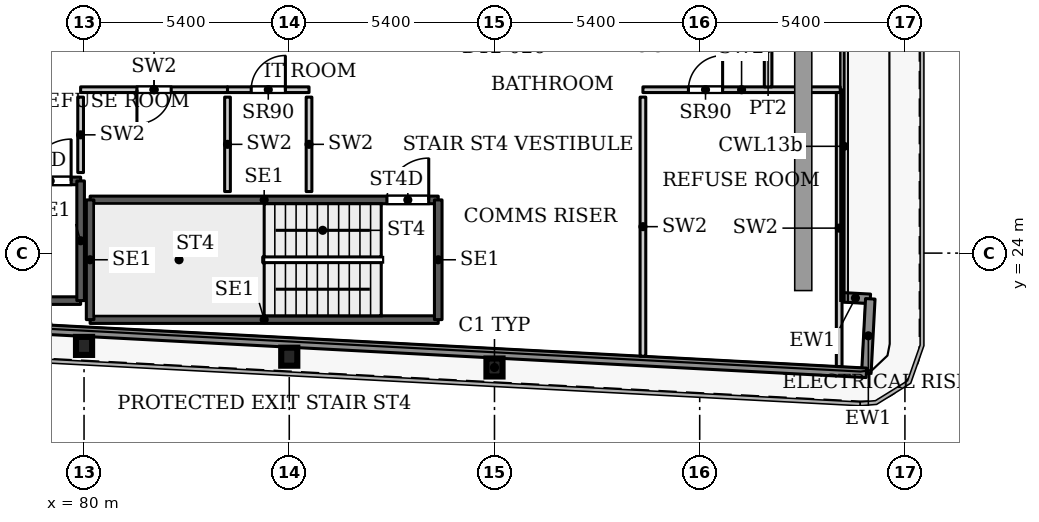
"""IFC4 building model, lengths in metres.
Left out: names, types, materials, properties, quantities, classifications, styles, units other than length and angle.
Written with IfcOpenShell. Run it as: python <this file> out.ifc"""

import sys

from ifc_helpers import new_model, si_unit, direction, frame, frame_2d, origin, origin_2d, place, context, subcontext, project, spatial, rectangle, i_section, extrude, source, transform, mapped, element, fill, save


model = new_model("IFC4")
c1 = context("Model", 3, precision=1e-05, world=origin(), true_north=direction((0.0, 1.0)))
c2 = subcontext(c1, "Body", "Model", "MODEL_VIEW")
j1 = project(units=[si_unit("LENGTHUNIT", "METRE"), si_unit("PLANEANGLEUNIT", "RADIAN")], contexts=[c1])
p1 = place(None, origin())
s1 = spatial("IfcSite", under=j1, at=p1, CompositionType="ELEMENT")
p2 = place(p1, origin())
s2 = spatial("IfcBuilding", under=s1, at=p2, CompositionType="ELEMENT")
p3 = place(p2, frame((0.0, 0.0, 57.8)))
s3 = spatial("IfcBuildingStorey", under=s2, at=p3, CompositionType="ELEMENT", Elevation=57.8)
for number, where, z_axis, x_axis in (
    (1, (90.8, 20.99, 0.0), (0.0, 0.0, 1.0), (1.0, 0.0, 0.0)),
    (2, (85.4, 21.274, 0.0), (0.0, 0.0, 1.0), (1.0, 0.0, 0.0)),
    (3, (80.0, 21.558, 0.0), (0.0, 0.0, 1.0), (1.0, 0.0, 0.0)),
):
    element("IfcColumn", number, at=place(p3, frame(where, z_axis=z_axis, x_axis=x_axis)), inside=s3, PredefinedType="COLUMN", context=c2, shape_type="SweptSolid", body=[
        extrude(i_section(OverallWidth=0.424, OverallDepth=0.474, WebThickness=0.048, FlangeThickness=0.077, FilletRadius=0.014, at=origin_2d()), origin(), (0.0, 0.0, 1.0), 3.9),
    ])
p4 = place(p3, frame((99.907, 22.839, 0.0), z_axis=(0.0, 0.0, 1.0), x_axis=(0.998561284263, -0.053622398031, 0.0)))
e4 = element("IfcWall", 4, at=p4, inside=s3, PredefinedType="SOLIDWALL", context=c2, shape_type="SweptSolid", body=[
    extrude(rectangle(XDim=0.783, YDim=0.25, at=frame_2d((0.392, 0.0))), origin(), (0.0, 0.0, 1.0), 3.75),
])
p5 = place(p3, frame((100.689, 22.797, 0.0), z_axis=(0.0, 0.0, 1.0), x_axis=(-0.052841433274, -0.998602915542, 0.0)))
e5 = element("IfcWall", 5, at=p5, inside=s3, PredefinedType="SOLIDWALL", context=c2, shape_type="SweptSolid", body=[
    extrude(rectangle(XDim=1.95, YDim=0.25, at=frame_2d((0.975, 0.0))), origin(), (0.0, 0.0, 1.0), 3.75),
])
p6 = place(p3, frame((100.586, 20.85, 0.0), z_axis=(0.0, 0.0, 1.0), x_axis=(-0.99861746497, 0.052565755559, 0.0)))
e6 = element("IfcWall", 6, at=p6, inside=s3, PredefinedType="SOLIDWALL", context=c2, shape_type="SweptSolid", body=[
    extrude(rectangle(XDim=66.639, YDim=0.25, at=frame_2d((33.319, 0.0))), origin(), (0.0, 0.0, 1.0), 3.75),
])
p7 = place(p3, frame((80.16, 22.25, 0.0), z_axis=(0.0, 0.0, 1.0), x_axis=(1.0, 0.0, 0.0)))
e7 = element("IfcWall", 7, at=p7, inside=s3, PredefinedType="SHEAR", context=c2, shape_type="SweptSolid", body=[
    extrude(rectangle(XDim=9.16, YDim=0.2, at=frame_2d((4.58, 0.0))), origin(), (0.0, 0.0, 1.0), 3.9),
])
p8 = place(p3, frame((80.16, 25.4, 0.0), z_axis=(0.0, 0.0, 1.0), x_axis=(1.0, 0.0, 0.0)))
e8 = element("IfcWall", 8, at=p8, inside=s3, PredefinedType="SHEAR", context=c2, shape_type="SweptSolid", body=[
    extrude(rectangle(XDim=9.16, YDim=0.2, at=frame_2d((4.58, 0.0))), origin(), (0.0, 0.0, 1.0), 3.9),
])
p9 = place(p8, frame((7.81, 0.0, 0.0)))
e9 = element("IfcOpeningElement", 9, at=p9, cuts=e8, PredefinedType="OPENING", context=c2, shape_type="SweptSolid", body=[
    extrude(rectangle(XDim=1.1, YDim=2.2, at=frame_2d((0.55, 1.1))), frame((0.0, 0.11, 0.0), z_axis=(0.0, -1.0, 0.0), x_axis=(1.0, 0.0, 0.0)), (0.0, 0.0, 1.0), 0.22),
])
for number, where, z_axis, x_axis in (
    (10, (80.16, 22.25, 0.0), (0.0, 0.0, 1.0), (0.0, 1.0, 0.0)),
    (11, (89.32, 22.25, 0.0), (0.0, 0.0, 1.0), (0.0, 1.0, 0.0)),
):
    element("IfcWall", number, at=place(p3, frame(where, z_axis=z_axis, x_axis=x_axis)), inside=s3, PredefinedType="SHEAR", context=c2, shape_type="SweptSolid", body=[
        extrude(rectangle(XDim=3.15, YDim=0.2, at=frame_2d((1.575, 0.0))), origin(), (0.0, 0.0, 1.0), 3.9),
    ])
p10 = place(p3, frame((70.75, 22.75, 0.0), z_axis=(0.0, 0.0, 1.0), x_axis=(1.0, 0.0, 0.0)))
e12 = element("IfcWall", 12, at=p10, inside=s3, PredefinedType="SHEAR", context=c2, shape_type="SweptSolid", body=[
    extrude(rectangle(XDim=9.16, YDim=0.2, at=frame_2d((4.58, 0.0))), origin(), (0.0, 0.0, 1.0), 3.9),
])
p11 = place(p3, frame((70.75, 25.9, 0.0), z_axis=(0.0, 0.0, 1.0), x_axis=(1.0, 0.0, 0.0)))
e13 = element("IfcWall", 13, at=p11, inside=s3, PredefinedType="SHEAR", context=c2, shape_type="SweptSolid", body=[
    extrude(rectangle(XDim=9.16, YDim=0.2, at=frame_2d((4.58, 0.0))), origin(), (0.0, 0.0, 1.0), 3.9),
])
p12 = place(p11, frame((7.81, 0.0, 0.0)))
e14 = element("IfcOpeningElement", 14, at=p12, cuts=e13, PredefinedType="OPENING", context=c2, shape_type="SweptSolid", body=[
    extrude(rectangle(XDim=1.1, YDim=2.2, at=frame_2d((0.55, 1.1))), frame((0.0, 0.11, 0.0), z_axis=(0.0, -1.0, 0.0), x_axis=(1.0, 0.0, 0.0)), (0.0, 0.0, 1.0), 0.22),
])
p13 = place(p3, frame((79.91, 22.75, 0.0), z_axis=(0.0, 0.0, 1.0), x_axis=(0.0, 1.0, 0.0)))
e15 = element("IfcWall", 15, at=p13, inside=s3, PredefinedType="SHEAR", context=c2, shape_type="SweptSolid", body=[
    extrude(rectangle(XDim=3.15, YDim=0.2, at=frame_2d((1.575, 0.0))), origin(), (0.0, 0.0, 1.0), 3.9),
])
p14 = place(p3, frame((79.91, 28.3, 0.0), z_axis=(0.0, 0.0, 1.0), x_axis=(1.0, 0.0, 0.0)))
e16 = element("IfcWall", 16, at=p14, inside=s3, PredefinedType="PARTITIONING", context=c2, shape_type="SweptSolid", body=[
    extrude(rectangle(XDim=3.865, YDim=0.15, at=frame_2d((1.933, 0.0))), origin(), (0.0, 0.0, 1.0), 3.9),
])
p15 = place(p14, frame((1.482, 0.0, 0.0)))
e17 = element("IfcOpeningElement", 17, at=p15, cuts=e16, PredefinedType="OPENING", context=c2, shape_type="SweptSolid", body=[
    extrude(rectangle(XDim=0.9, YDim=2.2, at=frame_2d((0.45, 1.1))), frame((0.0, 0.085, 0.0), z_axis=(0.0, -1.0, 0.0), x_axis=(1.0, 0.0, 0.0)), (0.0, 0.0, 1.0), 0.17),
])
p16 = place(p3, frame((79.91, 26.12, 0.0), z_axis=(0.0, 0.0, 1.0), x_axis=(0.0, 1.0, 0.0)))
e18 = element("IfcWall", 18, at=p16, inside=s3, PredefinedType="PARTITIONING", context=c2, shape_type="SweptSolid", body=[
    extrude(rectangle(XDim=1.985, YDim=0.15, at=frame_2d((0.992, 0.0))), origin(), (0.0, 0.0, 1.0), 3.9),
])
p17 = place(p3, frame((83.775, 25.62, 0.0), z_axis=(0.0, 0.0, 1.0), x_axis=(0.0, 1.0, 0.0)))
e19 = element("IfcWall", 19, at=p17, inside=s3, PredefinedType="PARTITIONING", context=c2, shape_type="SweptSolid", body=[
    extrude(rectangle(XDim=2.485, YDim=0.15, at=frame_2d((1.242, 0.0))), origin(), (0.0, 0.0, 1.0), 3.9),
])
p18 = place(p3, frame((83.775, 28.3, 0.0), z_axis=(0.0, 0.0, 1.0), x_axis=(1.0, 0.0, 0.0)))
e20 = element("IfcWall", 20, at=p18, inside=s3, PredefinedType="PARTITIONING", context=c2, shape_type="SweptSolid", body=[
    extrude(rectangle(XDim=2.145, YDim=0.15, at=frame_2d((1.073, 0.0))), origin(), (0.0, 0.0, 1.0), 3.9),
])
p19 = place(p18, frame((0.623, 0.0, 0.0)))
e21 = element("IfcOpeningElement", 21, at=p19, cuts=e20, PredefinedType="OPENING", context=c2, shape_type="SweptSolid", body=[
    extrude(rectangle(XDim=0.9, YDim=2.2, at=frame_2d((0.45, 1.1))), frame((0.0, 0.085, 0.0), z_axis=(0.0, -1.0, 0.0), x_axis=(1.0, 0.0, 0.0)), (0.0, 0.0, 1.0), 0.17),
])
p20 = place(p3, frame((85.92, 25.62, 0.0), z_axis=(0.0, 0.0, 1.0), x_axis=(0.0, 1.0, 0.0)))
e22 = element("IfcWall", 22, at=p20, inside=s3, PredefinedType="PARTITIONING", context=c2, shape_type="SweptSolid", body=[
    extrude(rectangle(XDim=2.485, YDim=0.15, at=frame_2d((1.242, 0.0))), origin(), (0.0, 0.0, 1.0), 3.9),
])
p21 = place(p3, frame((99.87, 21.015, 0.0), z_axis=(0.0, 0.0, 1.0), x_axis=(0.0, 1.0, 0.0)))
e23 = element("IfcWall", 23, at=p21, inside=s3, PredefinedType="PARTITIONING", context=c2, shape_type="SweptSolid", body=[
    extrude(rectangle(XDim=7.285, YDim=0.15, at=frame_2d((3.643, 0.0))), origin(), (0.0, 0.0, 1.0), 3.9),
])
p22 = place(p3, frame((94.706, 28.3, 0.0), z_axis=(0.0, 0.0, 1.0), x_axis=(1.0, 0.0, 0.0)))
e24 = element("IfcWall", 24, at=p22, inside=s3, PredefinedType="PARTITIONING", context=c2, shape_type="SweptSolid", body=[
    extrude(rectangle(XDim=5.192, YDim=0.15, at=frame_2d((2.596, 0.0))), origin(), (0.0, 0.0, 1.0), 3.9),
])
p23 = place(p22, frame((1.197, 0.0, 0.0)))
e25 = element("IfcOpeningElement", 25, at=p23, cuts=e24, PredefinedType="OPENING", context=c2, shape_type="SweptSolid", body=[
    extrude(rectangle(XDim=0.9, YDim=2.2, at=frame_2d((0.45, 1.1))), frame((0.0, 0.085, 0.0), z_axis=(0.0, -1.0, 0.0), x_axis=(1.0, 0.0, 0.0)), (0.0, 0.0, 1.0), 0.17),
])
p24 = place(p3, frame((94.706, 21.287, 0.0), z_axis=(0.0, 0.0, 1.0), x_axis=(0.0, 1.0, 0.0)))
e26 = element("IfcWall", 26, at=p24, inside=s3, PredefinedType="PARTITIONING", context=c2, shape_type="SweptSolid", body=[
    extrude(rectangle(XDim=6.818, YDim=0.15, at=frame_2d((3.409, 0.0))), origin(), (0.0, 0.0, 1.0), 3.9),
])
p25 = place(p3, frame((98.0, 28.374, 0.0), z_axis=(0.0, 0.0, 1.0), x_axis=(0.0, 1.0, 0.0)))
e27 = element("IfcWall", 27, at=p25, inside=s3, PredefinedType="PARTITIONING", context=c2, shape_type="SweptSolid", body=[
    extrude(rectangle(XDim=2.026, YDim=0.2, at=frame_2d((1.013, 0.0))), origin(), (0.0, 0.0, 1.0), 3.6),
])
m1 = source(origin(), c2, "Body", "SweptSolid", [
    extrude(rectangle(XDim=0.9, YDim=2.2, at=frame_2d((0.45, 1.1))), frame((0.0, 0.025, 0.0), z_axis=(0.0, -1.0, 0.0), x_axis=(1.0, 0.0, 0.0)), (0.0, 0.0, 1.0), 0.05),
])
p26 = place(p15, origin())
e28 = element("IfcDoor", 28, at=p26, inside=s3, OperationType="SINGLE_SWING_RIGHT", PredefinedType="DOOR", context=c2, shape_type="MappedRepresentation", body=[
    mapped(m1, transform((0.0, 0.0, 0.0), x_axis=(1.0, 0.0, 0.0), y_axis=(0.0, 1.0, 0.0), z_axis=(0.0, 0.0, 1.0), scale=1.0)),
])
fill(e17, e28)
p27 = place(p19, origin())
e29 = element("IfcDoor", 29, at=p27, inside=s3, OperationType="SINGLE_SWING_LEFT", PredefinedType="DOOR", context=c2, shape_type="MappedRepresentation", body=[
    mapped(m1, transform((0.0, 0.0, 0.0), x_axis=(1.0, 0.0, 0.0), y_axis=(0.0, 1.0, 0.0), z_axis=(0.0, 0.0, 1.0), scale=1.0)),
])
fill(e21, e29)
p28 = place(p23, origin())
e30 = element("IfcDoor", 30, at=p28, inside=s3, OperationType="SINGLE_SWING_LEFT", PredefinedType="DOOR", context=c2, shape_type="MappedRepresentation", body=[
    mapped(m1, transform((0.0, 0.0, 0.0), x_axis=(1.0, 0.0, 0.0), y_axis=(0.0, 1.0, 0.0), z_axis=(0.0, 0.0, 1.0), scale=1.0)),
])
fill(e25, e30)
m2 = source(origin(), c2, "Body", "SweptSolid", [
    extrude(rectangle(XDim=1.1, YDim=2.2, at=frame_2d((0.55, 1.1))), frame((0.0, 0.025, 0.0), z_axis=(0.0, -1.0, 0.0), x_axis=(1.0, 0.0, 0.0)), (0.0, 0.0, 1.0), 0.05),
])
p29 = place(p9, origin())
e31 = element("IfcDoor", 31, at=p29, inside=s3, OperationType="SINGLE_SWING_LEFT", PredefinedType="DOOR", context=c2, shape_type="MappedRepresentation", body=[
    mapped(m2, transform((0.0, 0.0, 0.0), x_axis=(1.0, 0.0, 0.0), y_axis=(0.0, 1.0, 0.0), z_axis=(0.0, 0.0, 1.0), scale=1.0)),
])
fill(e9, e31)
p30 = place(p12, origin())
e32 = element("IfcDoor", 32, at=p30, inside=s3, OperationType="SINGLE_SWING_LEFT", PredefinedType="DOOR", context=c2, shape_type="MappedRepresentation", body=[
    mapped(m2, transform((0.0, 0.0, 0.0), x_axis=(1.0, 0.0, 0.0), y_axis=(0.0, 1.0, 0.0), z_axis=(0.0, 0.0, 1.0), scale=1.0)),
])
fill(e14, e32)
save(model, sys.argv[1])
